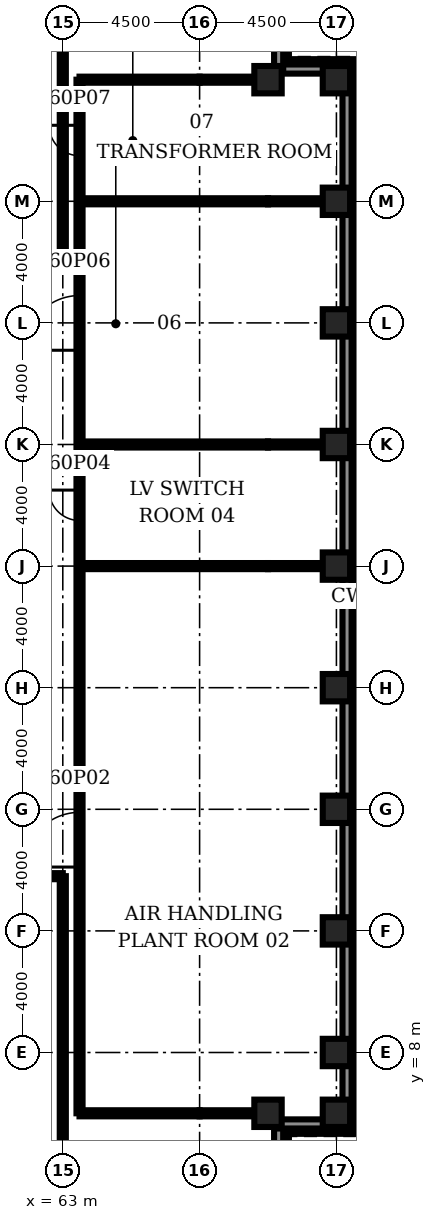
"""IFC4 building model, lengths in metres.
Left out: names, types, materials, properties, quantities, classifications, styles, units other than length and angle.
Written with IfcOpenShell. Run it as: python <this file> out.ifc"""

import sys

from ifc_helpers import new_model, si_unit, direction, frame, frame_2d, origin, origin_2d, place, context, subcontext, project, spatial, rectangle, hollow_rectangle, extrude, element, fill, save


model = new_model("IFC4")
c1 = context("Model", 3, precision=1e-05, world=origin(), true_north=direction((0.0, 1.0)))
c2 = subcontext(c1, "Body", "Model", "MODEL_VIEW")
j1 = project(units=[si_unit("LENGTHUNIT", "METRE"), si_unit("PLANEANGLEUNIT", "RADIAN")], contexts=[c1])
p1 = place(None, origin())
s1 = spatial("IfcSite", under=j1, at=p1, CompositionType="ELEMENT")
p2 = place(p1, origin())
s2 = spatial("IfcBuilding", under=s1, at=p2, CompositionType="ELEMENT")
p3 = place(p2, frame((0.0, 0.0, 265.6)))
s3 = spatial("IfcBuildingStorey", under=s2, at=p3, CompositionType="ELEMENT", Elevation=265.6)
for number, where, z_axis, x_axis in (
    (1, (69.68, 6.0, 0.172), (-0.379, 0.0, 0.926), (0.926, 0.0, 0.379)),
    (2, (71.93, 6.0, 0.172), (-0.379, 0.0, 0.926), (0.926, 0.0, 0.379)),
    (3, (71.93, 8.0, 0.172), (-0.379, 0.0, 0.926), (0.926, 0.0, 0.379)),
    (4, (71.93, 12.0, 0.172), (-0.379, 0.0, 0.926), (0.926, 0.0, 0.379)),
    (5, (71.93, 16.0, 0.172), (-0.379, 0.0, 0.926), (0.926, 0.0, 0.379)),
    (6, (71.93, 20.0, 0.172), (-0.379, 0.0, 0.926), (0.926, 0.0, 0.379)),
    (7, (71.93, 24.0, 0.172), (-0.379, 0.0, 0.926), (0.926, 0.0, 0.379)),
    (8, (71.93, 28.0, 0.172), (-0.379, 0.0, 0.926), (0.926, 0.0, 0.379)),
    (9, (71.93, 32.0, 0.172), (-0.379, 0.0, 0.926), (0.926, 0.0, 0.379)),
    (10, (71.93, 36.0, 0.172), (-0.379, 0.0, 0.926), (0.926, 0.0, 0.379)),
    (11, (71.93, 40.0, 0.172), (-0.379, 0.0, 0.926), (0.926, 0.0, 0.379)),
    (12, (69.68, 40.0, 0.172), (-0.379, 0.0, 0.926), (0.926, 0.0, 0.379)),
):
    element("IfcColumn", number, at=place(p3, frame(where, z_axis=z_axis, x_axis=x_axis)), inside=s3, PredefinedType="USERDEFINED", context=c2, shape_type="SweptSolid", body=[
        extrude(hollow_rectangle(XDim=0.9, YDim=0.9, WallThickness=0.07, at=origin_2d()), origin(), (0.0, 0.0, 1.0), 5.57),
    ])
p4 = place(p3, frame((63.55, 6.0, 0.0), z_axis=(0.0, 0.0, 1.0), x_axis=(1.0, 0.0, 0.0)))
e13 = element("IfcWall", 13, at=p4, inside=s3, PredefinedType="PARTITIONING", context=c2, shape_type="SweptSolid", body=[
    extrude(rectangle(XDim=3.95, YDim=0.2, at=frame_2d((1.975, 0.0))), origin(), (0.0, 0.0, 1.0), 5.34),
])
p5 = place(p3, frame((67.5, 6.0, 0.0), z_axis=(0.0, 0.0, 1.0), x_axis=(1.0, 0.0, 0.0)))
e14 = element("IfcWall", 14, at=p5, inside=s3, PredefinedType="PARTITIONING", context=c2, shape_type="SweptSolid", body=[
    extrude(rectangle(XDim=1.8, YDim=0.2, at=frame_2d((0.9, 0.0))), origin(), (0.0, 0.0, 1.0), 4.64),
])
p6 = place(p3, frame((9.0, 13.8, 0.0), z_axis=(0.0, 0.0, 1.0), x_axis=(1.0, 0.0, 0.0)))
e15 = element("IfcWall", 15, at=p6, inside=s3, PredefinedType="PARTITIONING", context=c2, shape_type="SweptSolid", body=[
    extrude(rectangle(XDim=54.0, YDim=0.2, at=frame_2d((27.0, 0.0))), origin(), (0.0, 0.0, 1.0), 5.34),
])
p7 = place(p6, frame((26.1, 0.0, 0.0)))
e16 = element("IfcOpeningElement", 16, at=p7, cuts=e15, PredefinedType="OPENING", context=c2, shape_type="SweptSolid", body=[
    extrude(rectangle(XDim=1.8, YDim=2.1, at=frame_2d((0.9, 1.05))), frame((0.0, 0.11, 0.0), z_axis=(0.0, -1.0, 0.0), x_axis=(1.0, 0.0, 0.0)), (0.0, 0.0, 1.0), 0.22),
])
p8 = place(p3, frame((63.55, 24.0, 0.0), z_axis=(0.0, 0.0, 1.0), x_axis=(1.0, 0.0, 0.0)))
e17 = element("IfcWall", 17, at=p8, inside=s3, PredefinedType="PARTITIONING", context=c2, shape_type="SweptSolid", body=[
    extrude(rectangle(XDim=6.2, YDim=0.2, at=frame_2d((3.1, 0.0))), origin(), (0.0, 0.0, 1.0), 5.25),
])
p9 = place(p3, frame((69.75, 24.0, 0.0), z_axis=(0.0, 0.0, 1.0), x_axis=(1.0, 0.0, 0.0)))
e18 = element("IfcWall", 18, at=p9, inside=s3, PredefinedType="PARTITIONING", context=c2, shape_type="SweptSolid", body=[
    extrude(rectangle(XDim=1.8, YDim=0.2, at=frame_2d((0.9, 0.0))), origin(), (0.0, 0.0, 1.0), 4.726),
])
p10 = place(p3, frame((63.55, 28.0, 0.0), z_axis=(0.0, 0.0, 1.0), x_axis=(1.0, 0.0, 0.0)))
e19 = element("IfcWall", 19, at=p10, inside=s3, PredefinedType="PARTITIONING", context=c2, shape_type="SweptSolid", body=[
    extrude(rectangle(XDim=6.2, YDim=0.2, at=frame_2d((3.1, 0.0))), origin(), (0.0, 0.0, 1.0), 5.25),
])
p11 = place(p3, frame((69.75, 28.0, 0.0), z_axis=(0.0, 0.0, 1.0), x_axis=(1.0, 0.0, 0.0)))
e20 = element("IfcWall", 20, at=p11, inside=s3, PredefinedType="PARTITIONING", context=c2, shape_type="SweptSolid", body=[
    extrude(rectangle(XDim=1.8, YDim=0.2, at=frame_2d((0.9, 0.0))), origin(), (0.0, 0.0, 1.0), 4.726),
])
p12 = place(p3, frame((9.0, 34.2, 0.0), z_axis=(0.0, 0.0, 1.0), x_axis=(1.0, 0.0, 0.0)))
e21 = element("IfcWall", 21, at=p12, inside=s3, PredefinedType="PARTITIONING", context=c2, shape_type="SweptSolid", body=[
    extrude(rectangle(XDim=54.0, YDim=0.2, at=frame_2d((27.0, 0.0))), origin(), (0.0, 0.0, 1.0), 5.34),
])
p13 = place(p12, frame((26.1, 0.0, 0.0)))
e22 = element("IfcOpeningElement", 22, at=p13, cuts=e21, PredefinedType="OPENING", context=c2, shape_type="SweptSolid", body=[
    extrude(rectangle(XDim=1.8, YDim=2.1, at=frame_2d((0.9, 1.05))), frame((0.0, 0.11, 0.0), z_axis=(0.0, -1.0, 0.0), x_axis=(1.0, 0.0, 0.0)), (0.0, 0.0, 1.0), 0.22),
])
p14 = place(p3, frame((63.55, 36.0, 0.0), z_axis=(0.0, 0.0, 1.0), x_axis=(1.0, 0.0, 0.0)))
e23 = element("IfcWall", 23, at=p14, inside=s3, PredefinedType="PARTITIONING", context=c2, shape_type="SweptSolid", body=[
    extrude(rectangle(XDim=6.2, YDim=0.2, at=frame_2d((3.1, 0.0))), origin(), (0.0, 0.0, 1.0), 5.25),
])
p15 = place(p3, frame((69.75, 36.0, 0.0), z_axis=(0.0, 0.0, 1.0), x_axis=(1.0, 0.0, 0.0)))
e24 = element("IfcWall", 24, at=p15, inside=s3, PredefinedType="PARTITIONING", context=c2, shape_type="SweptSolid", body=[
    extrude(rectangle(XDim=1.8, YDim=0.2, at=frame_2d((0.9, 0.0))), origin(), (0.0, 0.0, 1.0), 4.726),
])
p16 = place(p3, frame((63.55, 40.0, 0.0), z_axis=(0.0, 0.0, 1.0), x_axis=(1.0, 0.0, 0.0)))
e25 = element("IfcWall", 25, at=p16, inside=s3, PredefinedType="PARTITIONING", context=c2, shape_type="SweptSolid", body=[
    extrude(rectangle(XDim=3.95, YDim=0.2, at=frame_2d((1.975, 0.0))), origin(), (0.0, 0.0, 1.0), 5.34),
])
p17 = place(p3, frame((67.5, 40.0, 0.0), z_axis=(0.0, 0.0, 1.0), x_axis=(1.0, 0.0, 0.0)))
e26 = element("IfcWall", 26, at=p17, inside=s3, PredefinedType="PARTITIONING", context=c2, shape_type="SweptSolid", body=[
    extrude(rectangle(XDim=1.8, YDim=0.2, at=frame_2d((0.9, 0.0))), origin(), (0.0, 0.0, 1.0), 4.64),
])
p18 = place(p3, frame((63.0, 2.45, 0.0), z_axis=(0.0, 0.0, 1.0), x_axis=(0.0, 1.0, 0.0)))
e27 = element("IfcWall", 27, at=p18, inside=s3, PredefinedType="PARTITIONING", context=c2, shape_type="SweptSolid", body=[
    extrude(rectangle(XDim=11.35, YDim=0.2, at=frame_2d((5.675, 0.0))), origin(), (0.0, 0.0, 1.0), 5.34),
])
p19 = place(p3, frame((63.0, 34.2, 0.0), z_axis=(0.0, 0.0, 1.0), x_axis=(0.0, 1.0, 0.0)))
e28 = element("IfcWall", 28, at=p19, inside=s3, PredefinedType="PARTITIONING", context=c2, shape_type="SweptSolid", body=[
    extrude(rectangle(XDim=9.35, YDim=0.2, at=frame_2d((4.675, 0.0))), origin(), (0.0, 0.0, 1.0), 5.34),
])
p20 = place(p3, frame((63.55, 6.0, 0.0), z_axis=(0.0, 0.0, 1.0), x_axis=(0.0, 1.0, 0.0)))
e29 = element("IfcWall", 29, at=p20, inside=s3, PredefinedType="PARTITIONING", context=c2, shape_type="SweptSolid", body=[
    extrude(rectangle(XDim=34.0, YDim=0.2, at=frame_2d((17.0, 0.0))), origin(), (0.0, 0.0, 1.0), 5.34),
])
p21 = place(p20, frame((8.1, 0.0, 0.0)))
e30 = element("IfcOpeningElement", 30, at=p21, cuts=e29, PredefinedType="OPENING", context=c2, shape_type="SweptSolid", body=[
    extrude(rectangle(XDim=1.8, YDim=2.1, at=frame_2d((0.9, 1.05))), frame((0.0, 0.11, 0.0), z_axis=(0.0, -1.0, 0.0), x_axis=(1.0, 0.0, 0.0)), (0.0, 0.0, 1.0), 0.22),
])
p22 = place(p20, frame((19.5, 0.0, 0.0)))
e31 = element("IfcOpeningElement", 31, at=p22, cuts=e29, PredefinedType="OPENING", context=c2, shape_type="SweptSolid", body=[
    extrude(rectangle(XDim=1.0, YDim=2.1, at=frame_2d((0.5, 1.05))), frame((0.0, 0.11, 0.0), z_axis=(0.0, -1.0, 0.0), x_axis=(1.0, 0.0, 0.0)), (0.0, 0.0, 1.0), 0.22),
])
p23 = place(p20, frame((25.1, 0.0, 0.0)))
e32 = element("IfcOpeningElement", 32, at=p23, cuts=e29, PredefinedType="OPENING", context=c2, shape_type="SweptSolid", body=[
    extrude(rectangle(XDim=1.8, YDim=2.1, at=frame_2d((0.9, 1.05))), frame((0.0, 0.11, 0.0), z_axis=(0.0, -1.0, 0.0), x_axis=(1.0, 0.0, 0.0)), (0.0, 0.0, 1.0), 0.22),
])
p24 = place(p20, frame((31.5, 0.0, 0.0)))
e33 = element("IfcOpeningElement", 33, at=p24, cuts=e29, PredefinedType="OPENING", context=c2, shape_type="SweptSolid", body=[
    extrude(rectangle(XDim=1.0, YDim=2.1, at=frame_2d((0.5, 1.05))), frame((0.0, 0.11, 0.0), z_axis=(0.0, -1.0, 0.0), x_axis=(1.0, 0.0, 0.0)), (0.0, 0.0, 1.0), 0.22),
])
p25 = place(p3, frame((70.35, 3.4, 0.0), z_axis=(0.0, 0.0, 1.0), x_axis=(0.0, 1.0, 0.0)))
e34 = element("IfcWall", 34, at=p25, inside=s3, PredefinedType="ELEMENTEDWALL", context=c2, shape_type="SweptSolid", body=[
    extrude(rectangle(XDim=2.0, YDim=0.15, at=frame_2d((1.0, 0.0))), origin(), (0.0, 0.0, 1.0), 5.34),
])
for number, where, z_axis, x_axis in (
    (35, (70.35, 5.4, 0.0), (0.0, 0.0, 1.0), (1.0, 0.0, 0.0)),
    (36, (72.6, 40.6, 0.0), (0.0, 0.0, 1.0), (-1.0, 0.0, 0.0)),
):
    element("IfcWall", number, at=place(p3, frame(where, z_axis=z_axis, x_axis=x_axis)), inside=s3, PredefinedType="ELEMENTEDWALL", context=c2, shape_type="SweptSolid", body=[
        extrude(rectangle(XDim=2.25, YDim=0.15, at=frame_2d((1.125, 0.0))), origin(), (0.0, 0.0, 1.0), 5.34),
    ])
p26 = place(p3, frame((70.35, 40.6, 0.0), z_axis=(0.0, 0.0, 1.0), x_axis=(0.0, 1.0, 0.0)))
e37 = element("IfcWall", 37, at=p26, inside=s3, PredefinedType="ELEMENTEDWALL", context=c2, shape_type="SweptSolid", body=[
    extrude(rectangle(XDim=2.0, YDim=0.15, at=frame_2d((1.0, 0.0))), origin(), (0.0, 0.0, 1.0), 5.34),
])
p27 = place(p3, frame((70.1, 3.65, 5.5), z_axis=(0.0, 0.0, 1.0), x_axis=(0.0, 1.0, 0.0)))
e38 = element("IfcWall", 38, at=p27, inside=s3, PredefinedType="PARAPET", context=c2, shape_type="SweptSolid", body=[
    extrude(rectangle(XDim=2.0, YDim=0.3, at=frame_2d((1.0, 0.0))), origin(), (0.0, 0.0, 1.0), 1.1),
])
p28 = place(p3, frame((70.1, 5.65, 5.5), z_axis=(0.0, 0.0, 1.0), x_axis=(1.0, 0.0, 0.0)))
e39 = element("IfcWall", 39, at=p28, inside=s3, PredefinedType="PARAPET", context=c2, shape_type="SweptSolid", body=[
    extrude(rectangle(XDim=2.25, YDim=0.3, at=frame_2d((1.125, 0.0))), origin(), (0.0, 0.0, 1.0), 1.1),
])
p29 = place(p3, frame((72.35, 5.65, 5.5), z_axis=(0.0, 0.0, 1.0), x_axis=(0.0, 1.0, 0.0)))
e40 = element("IfcWall", 40, at=p29, inside=s3, PredefinedType="PARAPET", context=c2, shape_type="SweptSolid", body=[
    extrude(rectangle(XDim=34.7, YDim=0.3, at=frame_2d((17.35, 0.0))), origin(), (0.0, 0.0, 1.0), 1.1),
])
p30 = place(p3, frame((72.35, 40.35, 5.5), z_axis=(0.0, 0.0, 1.0), x_axis=(-1.0, 0.0, 0.0)))
e41 = element("IfcWall", 41, at=p30, inside=s3, PredefinedType="PARAPET", context=c2, shape_type="SweptSolid", body=[
    extrude(rectangle(XDim=2.25, YDim=0.3, at=frame_2d((1.125, 0.0))), origin(), (0.0, 0.0, 1.0), 1.1),
])
p31 = place(p3, frame((70.1, 40.35, 5.5), z_axis=(0.0, 0.0, 1.0), x_axis=(0.0, 1.0, 0.0)))
e42 = element("IfcWall", 42, at=p31, inside=s3, PredefinedType="PARAPET", context=c2, shape_type="SweptSolid", body=[
    extrude(rectangle(XDim=2.0, YDim=0.3, at=frame_2d((1.0, 0.0))), origin(), (0.0, 0.0, 1.0), 1.1),
])
p32 = place(p21, origin())
e43 = element("IfcDoor", 43, at=p32, inside=s3, OperationType="SINGLE_SWING_LEFT", PredefinedType="DOOR", context=c2, shape_type="SweptSolid", body=[
    extrude(rectangle(XDim=1.8, YDim=2.1, at=frame_2d((0.9, 1.05))), frame((0.0, 0.025, 0.0), z_axis=(0.0, -1.0, 0.0), x_axis=(1.0, 0.0, 0.0)), (0.0, 0.0, 1.0), 0.05),
])
fill(e30, e43)
p33 = place(p22, origin())
e44 = element("IfcDoor", 44, at=p33, inside=s3, OperationType="SINGLE_SWING_RIGHT", PredefinedType="DOOR", context=c2, shape_type="SweptSolid", body=[
    extrude(rectangle(XDim=1.0, YDim=2.1, at=frame_2d((0.5, 1.05))), frame((0.0, 0.025, 0.0), z_axis=(0.0, -1.0, 0.0), x_axis=(1.0, 0.0, 0.0)), (0.0, 0.0, 1.0), 0.05),
])
fill(e31, e44)
p34 = place(p23, origin())
e45 = element("IfcDoor", 45, at=p34, inside=s3, OperationType="SINGLE_SWING_LEFT", PredefinedType="DOOR", context=c2, shape_type="SweptSolid", body=[
    extrude(rectangle(XDim=1.8, YDim=2.1, at=frame_2d((0.9, 1.05))), frame((0.0, 0.025, 0.0), z_axis=(0.0, -1.0, 0.0), x_axis=(1.0, 0.0, 0.0)), (0.0, 0.0, 1.0), 0.05),
])
fill(e32, e45)
p35 = place(p24, origin())
e46 = element("IfcDoor", 46, at=p35, inside=s3, OperationType="SINGLE_SWING_RIGHT", PredefinedType="DOOR", context=c2, shape_type="SweptSolid", body=[
    extrude(rectangle(XDim=1.0, YDim=2.1, at=frame_2d((0.5, 1.05))), frame((0.0, 0.025, 0.0), z_axis=(0.0, -1.0, 0.0), x_axis=(1.0, 0.0, 0.0)), (0.0, 0.0, 1.0), 0.05),
])
fill(e33, e46)
save(model, sys.argv[1])
